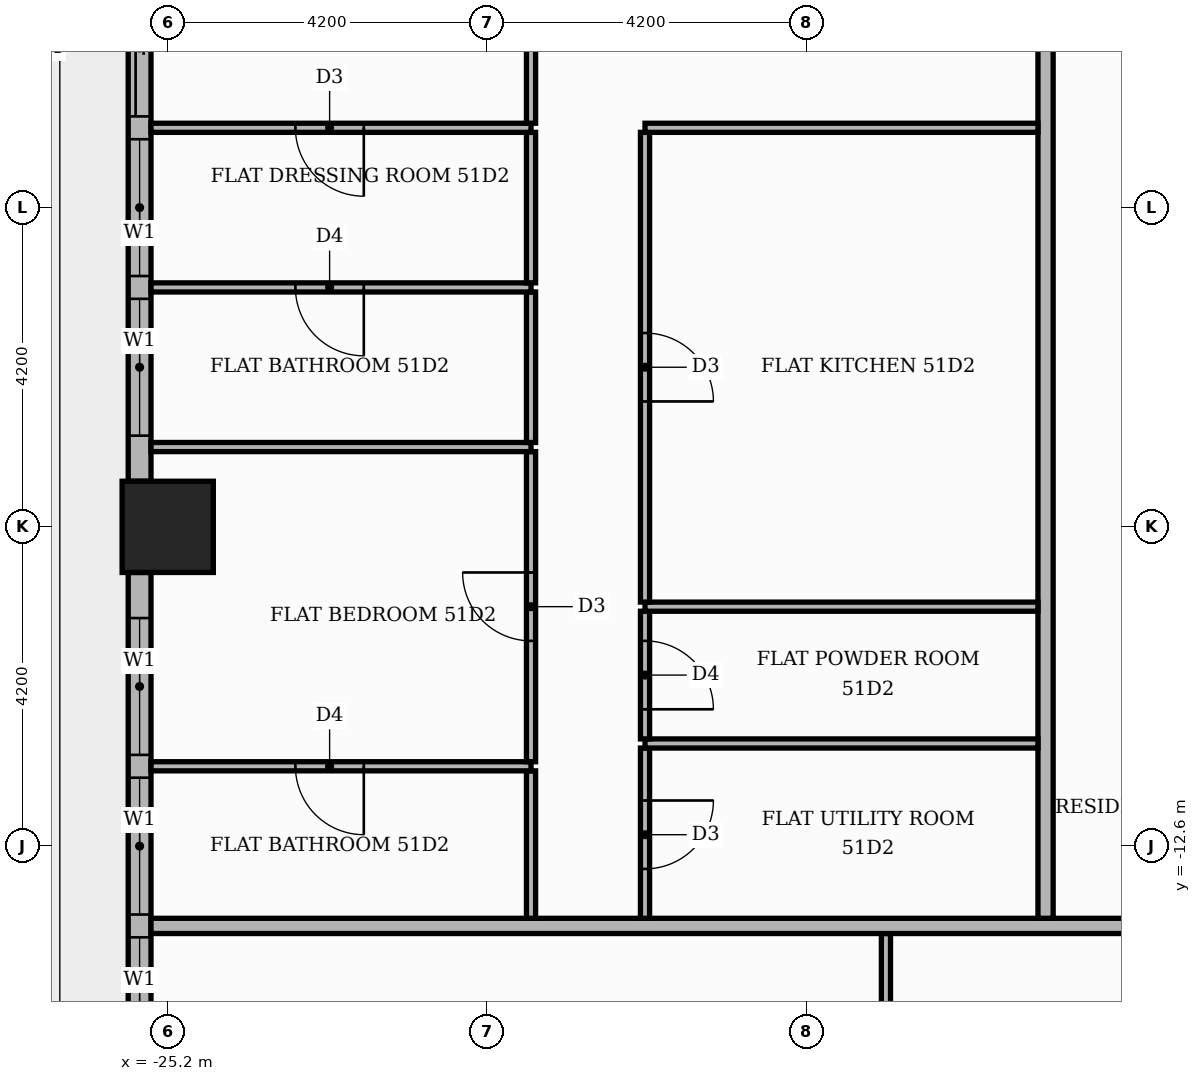
"""IFC4 building model, lengths in metres.
Left out: names, types, materials, properties, quantities, classifications, styles, units other than length and angle.
Written with IfcOpenShell. Run it as: python <this file> out.ifc"""

import sys

from ifc_helpers import new_model, si_unit, direction, frame, frame_2d, origin, origin_2d, place, context, subcontext, project, spatial, rectangle, extrude, element, fill, save


model = new_model("IFC4")
c1 = context("Model", 3, precision=1e-05, world=origin(), true_north=direction((0.0, 1.0)))
c2 = subcontext(c1, "Body", "Model", "MODEL_VIEW")
j1 = project(units=[si_unit("LENGTHUNIT", "METRE"), si_unit("PLANEANGLEUNIT", "RADIAN")], contexts=[c1])
p1 = place(None, origin())
s1 = spatial("IfcSite", under=j1, at=p1, CompositionType="ELEMENT")
p2 = place(p1, origin())
s2 = spatial("IfcBuilding", under=s1, at=p2, CompositionType="ELEMENT")
p3 = place(p2, frame((0.0, 0.0, 215.7)))
s3 = spatial("IfcBuildingStorey", under=s2, at=p3, CompositionType="ELEMENT", Elevation=215.7)
p4 = place(p3, frame((-25.2, -8.4, 0.0), z_axis=(0.0, 0.0, 1.0), x_axis=(1.0, 0.0, 0.0)))
e1 = element("IfcColumn", 1, at=p4, inside=s3, PredefinedType="COLUMN", context=c2, shape_type="SweptSolid", body=[
    extrude(rectangle(XDim=1.2, YDim=1.2, at=origin_2d()), origin(), (0.0, 0.0, 1.0), 3.9),
])
p5 = place(p3, frame((-25.57, -0.6, 0.0), z_axis=(0.0, 0.0, 1.0), x_axis=(0.0, -1.0, 0.0)))
e2 = element("IfcWall", 2, at=p5, inside=s3, PredefinedType="STANDARD", context=c2, shape_type="SweptSolid", body=[
    extrude(rectangle(XDim=7.2, YDim=0.3, at=frame_2d((3.6, 0.0))), origin(), (0.0, 0.0, 1.0), 3.48),
])
p6 = place(p5, frame((0.6, 0.0, 0.0)))
e3 = element("IfcOpeningElement", 3, at=p6, cuts=e2, PredefinedType="OPENING", context=c2, shape_type="SweptSolid", body=[
    extrude(rectangle(XDim=1.8, YDim=2.4, at=frame_2d((0.9, 1.2))), frame((0.0, 0.16, 0.0), z_axis=(0.0, -1.0, 0.0), x_axis=(1.0, 0.0, 0.0)), (0.0, 0.0, 1.0), 0.32),
])
p7 = place(p5, frame((2.7, 0.0, 0.9)))
e4 = element("IfcOpeningElement", 4, at=p7, cuts=e2, PredefinedType="OPENING", context=c2, shape_type="SweptSolid", body=[
    extrude(rectangle(XDim=1.8, YDim=2.1, at=frame_2d((0.9, 1.05))), frame((0.0, 0.16, 0.0), z_axis=(0.0, -1.0, 0.0), x_axis=(1.0, 0.0, 0.0)), (0.0, 0.0, 1.0), 0.32),
])
p8 = place(p5, frame((4.8, 0.0, 0.9)))
e5 = element("IfcOpeningElement", 5, at=p8, cuts=e2, PredefinedType="OPENING", context=c2, shape_type="SweptSolid", body=[
    extrude(rectangle(XDim=1.8, YDim=2.1, at=frame_2d((0.9, 1.05))), frame((0.0, 0.16, 0.0), z_axis=(0.0, -1.0, 0.0), x_axis=(1.0, 0.0, 0.0)), (0.0, 0.0, 1.0), 0.32),
])
p9 = place(p3, frame((-25.57, -9.0, 0.0), z_axis=(0.0, 0.0, 1.0), x_axis=(0.0, -1.0, 0.0)))
e6 = element("IfcWall", 6, at=p9, inside=s3, PredefinedType="STANDARD", context=c2, shape_type="SweptSolid", body=[
    extrude(rectangle(XDim=7.2, YDim=0.3, at=frame_2d((3.6, 0.0))), origin(), (0.0, 0.0, 1.0), 3.48),
])
p10 = place(p9, frame((0.6, 0.0, 0.9)))
e7 = element("IfcOpeningElement", 7, at=p10, cuts=e6, PredefinedType="OPENING", context=c2, shape_type="SweptSolid", body=[
    extrude(rectangle(XDim=1.8, YDim=2.1, at=frame_2d((0.9, 1.05))), frame((0.0, 0.16, 0.0), z_axis=(0.0, -1.0, 0.0), x_axis=(1.0, 0.0, 0.0)), (0.0, 0.0, 1.0), 0.32),
])
p11 = place(p9, frame((2.7, 0.0, 0.9)))
e8 = element("IfcOpeningElement", 8, at=p11, cuts=e6, PredefinedType="OPENING", context=c2, shape_type="SweptSolid", body=[
    extrude(rectangle(XDim=1.8, YDim=2.1, at=frame_2d((0.9, 1.05))), frame((0.0, 0.16, 0.0), z_axis=(0.0, -1.0, 0.0), x_axis=(1.0, 0.0, 0.0)), (0.0, 0.0, 1.0), 0.32),
])
p12 = place(p9, frame((4.8, 0.0, 0.9)))
e9 = element("IfcOpeningElement", 9, at=p12, cuts=e6, PredefinedType="OPENING", context=c2, shape_type="SweptSolid", body=[
    extrude(rectangle(XDim=1.8, YDim=2.1, at=frame_2d((0.9, 1.05))), frame((0.0, 0.16, 0.0), z_axis=(0.0, -1.0, 0.0), x_axis=(1.0, 0.0, 0.0)), (0.0, 0.0, 1.0), 0.32),
])
p13 = place(p3, frame((-15.75, -20.36, 0.0), z_axis=(0.0, 0.0, 1.0), x_axis=(0.0, 1.0, 0.0)))
e10 = element("IfcWall", 10, at=p13, inside=s3, PredefinedType="PARTITIONING", context=c2, shape_type="SweptSolid", body=[
    extrude(rectangle(XDim=6.61, YDim=0.12, at=frame_2d((3.305, 0.0))), origin(), (0.0, 0.0, 1.0), 3.48),
])
p14 = place(p13, frame((2.875, 0.0, 0.0)))
e11 = element("IfcOpeningElement", 11, at=p14, cuts=e10, PredefinedType="OPENING", context=c2, shape_type="SweptSolid", body=[
    extrude(rectangle(XDim=0.9, YDim=2.1, at=frame_2d((0.45, 1.05))), frame((0.0, 0.07, 0.0), z_axis=(0.0, -1.0, 0.0), x_axis=(1.0, 0.0, 0.0)), (0.0, 0.0, 1.0), 0.14),
])
p15 = place(p3, frame((-25.42, -13.65, 0.0), z_axis=(0.0, 0.0, 1.0), x_axis=(1.0, 0.0, 0.0)))
e12 = element("IfcWall", 12, at=p15, inside=s3, PredefinedType="PARTITIONING", context=c2, shape_type="SweptSolid", body=[
    extrude(rectangle(XDim=39.07, YDim=0.2, at=frame_2d((19.535, 0.0))), origin(), (0.0, 0.0, 1.0), 3.48),
])
p16 = place(p15, frame((13.32, 0.0, 0.0)))
e13 = element("IfcOpeningElement", 13, at=p16, cuts=e12, PredefinedType="OPENING", context=c2, shape_type="SweptSolid", body=[
    extrude(rectangle(XDim=1.1, YDim=2.4, at=frame_2d((0.55, 1.2))), frame((0.0, 0.11, 0.0), z_axis=(0.0, -1.0, 0.0), x_axis=(1.0, 0.0, 0.0)), (0.0, 0.0, 1.0), 0.22),
])
p17 = place(p3, frame((-20.42, -13.55, 0.0), z_axis=(0.0, 0.0, 1.0), x_axis=(0.0, 1.0, 0.0)))
e14 = element("IfcWall", 14, at=p17, inside=s3, PredefinedType="PARTITIONING", context=c2, shape_type="SweptSolid", body=[
    extrude(rectangle(XDim=1.94, YDim=0.12, at=frame_2d((0.97, 0.0))), origin(), (0.0, 0.0, 1.0), 3.48),
])
p18 = place(p3, frame((-18.92, -13.55, 0.0), z_axis=(0.0, 0.0, 1.0), x_axis=(0.0, 1.0, 0.0)))
e15 = element("IfcWall", 15, at=p18, inside=s3, PredefinedType="PARTITIONING", context=c2, shape_type="SweptSolid", body=[
    extrude(rectangle(XDim=2.24, YDim=0.12, at=frame_2d((1.12, 0.0))), origin(), (0.0, 0.0, 1.0), 3.48),
])
p19 = place(p18, frame((0.65, 0.0, 0.0)))
e16 = element("IfcOpeningElement", 16, at=p19, cuts=e15, PredefinedType="OPENING", context=c2, shape_type="SweptSolid", body=[
    extrude(rectangle(XDim=0.9, YDim=2.1, at=frame_2d((0.45, 1.05))), frame((0.0, 0.07, 0.0), z_axis=(0.0, -1.0, 0.0), x_axis=(1.0, 0.0, 0.0)), (0.0, 0.0, 1.0), 0.14),
])
p20 = place(p3, frame((-13.65, -13.55, 0.0), z_axis=(0.0, 0.0, 1.0), x_axis=(0.0, 1.0, 0.0)))
e17 = element("IfcWall", 17, at=p20, inside=s3, PredefinedType="PARTITIONING", context=c2, shape_type="SweptSolid", body=[
    extrude(rectangle(XDim=18.7, YDim=0.2, at=frame_2d((9.35, 0.0))), origin(), (0.0, 0.0, 1.0), 3.48),
])
p21 = place(p20, frame((11.95, 0.0, 0.0)))
e18 = element("IfcOpeningElement", 18, at=p21, cuts=e17, PredefinedType="OPENING", context=c2, shape_type="SweptSolid", body=[
    extrude(rectangle(XDim=1.1, YDim=2.4, at=frame_2d((0.55, 1.2))), frame((0.0, 0.11, 0.0), z_axis=(0.0, -1.0, 0.0), x_axis=(1.0, 0.0, 0.0)), (0.0, 0.0, 1.0), 0.22),
])
p22 = place(p3, frame((-25.42, -11.55, 0.0), z_axis=(0.0, 0.0, 1.0), x_axis=(1.0, 0.0, 0.0)))
e19 = element("IfcWall", 19, at=p22, inside=s3, PredefinedType="PARTITIONING", context=c2, shape_type="SweptSolid", body=[
    extrude(rectangle(XDim=5.0, YDim=0.12, at=frame_2d((2.5, 0.0))), origin(), (0.0, 0.0, 1.0), 3.48),
])
p23 = place(p22, frame((1.9, 0.0, 0.0)))
e20 = element("IfcOpeningElement", 20, at=p23, cuts=e19, PredefinedType="OPENING", context=c2, shape_type="SweptSolid", body=[
    extrude(rectangle(XDim=0.9, YDim=2.1, at=frame_2d((0.45, 1.05))), frame((0.0, 0.07, 0.0), z_axis=(0.0, -1.0, 0.0), x_axis=(1.0, 0.0, 0.0)), (0.0, 0.0, 1.0), 0.14),
])
p24 = place(p3, frame((-20.42, -11.49, 0.0), z_axis=(0.0, 0.0, 1.0), x_axis=(0.0, 1.0, 0.0)))
e21 = element("IfcWall", 21, at=p24, inside=s3, PredefinedType="PARTITIONING", context=c2, shape_type="SweptSolid", body=[
    extrude(rectangle(XDim=4.08, YDim=0.12, at=frame_2d((2.04, 0.0))), origin(), (0.0, 0.0, 1.0), 3.48),
])
p25 = place(p24, frame((1.59, 0.0, 0.0)))
e22 = element("IfcOpeningElement", 22, at=p25, cuts=e21, PredefinedType="OPENING", context=c2, shape_type="SweptSolid", body=[
    extrude(rectangle(XDim=0.9, YDim=2.1, at=frame_2d((0.45, 1.05))), frame((0.0, 0.07, 0.0), z_axis=(0.0, -1.0, 0.0), x_axis=(1.0, 0.0, 0.0)), (0.0, 0.0, 1.0), 0.14),
])
p26 = place(p3, frame((-18.92, -11.25, 0.0), z_axis=(0.0, 0.0, 1.0), x_axis=(1.0, 0.0, 0.0)))
e23 = element("IfcWall", 23, at=p26, inside=s3, PredefinedType="PARTITIONING", context=c2, shape_type="SweptSolid", body=[
    extrude(rectangle(XDim=5.17, YDim=0.12, at=frame_2d((2.585, 0.0))), origin(), (0.0, 0.0, 1.0), 3.48),
])
p27 = place(p3, frame((-18.92, -11.19, 0.0), z_axis=(0.0, 0.0, 1.0), x_axis=(0.0, 1.0, 0.0)))
e24 = element("IfcWall", 24, at=p27, inside=s3, PredefinedType="PARTITIONING", context=c2, shape_type="SweptSolid", body=[
    extrude(rectangle(XDim=1.68, YDim=0.12, at=frame_2d((0.84, 0.0))), origin(), (0.0, 0.0, 1.0), 3.48),
])
p28 = place(p27, frame((0.39, 0.0, 0.0)))
e25 = element("IfcOpeningElement", 25, at=p28, cuts=e24, PredefinedType="OPENING", context=c2, shape_type="SweptSolid", body=[
    extrude(rectangle(XDim=0.9, YDim=2.1, at=frame_2d((0.45, 1.05))), frame((0.0, 0.07, 0.0), z_axis=(0.0, -1.0, 0.0), x_axis=(1.0, 0.0, 0.0)), (0.0, 0.0, 1.0), 0.14),
])
p29 = place(p3, frame((-18.92, -9.45, 0.0), z_axis=(0.0, 0.0, 1.0), x_axis=(1.0, 0.0, 0.0)))
e26 = element("IfcWall", 26, at=p29, inside=s3, PredefinedType="PARTITIONING", context=c2, shape_type="SweptSolid", body=[
    extrude(rectangle(XDim=5.17, YDim=0.12, at=frame_2d((2.585, 0.0))), origin(), (0.0, 0.0, 1.0), 3.48),
])
p30 = place(p3, frame((-18.92, -9.39, 0.0), z_axis=(0.0, 0.0, 1.0), x_axis=(0.0, 1.0, 0.0)))
e27 = element("IfcWall", 27, at=p30, inside=s3, PredefinedType="PARTITIONING", context=c2, shape_type="SweptSolid", body=[
    extrude(rectangle(XDim=6.18, YDim=0.12, at=frame_2d((3.09, 0.0))), origin(), (0.0, 0.0, 1.0), 3.48),
])
p31 = place(p30, frame((2.64, 0.0, 0.0)))
e28 = element("IfcOpeningElement", 28, at=p31, cuts=e27, PredefinedType="OPENING", context=c2, shape_type="SweptSolid", body=[
    extrude(rectangle(XDim=0.9, YDim=2.1, at=frame_2d((0.45, 1.05))), frame((0.0, 0.07, 0.0), z_axis=(0.0, -1.0, 0.0), x_axis=(1.0, 0.0, 0.0)), (0.0, 0.0, 1.0), 0.14),
])
p32 = place(p3, frame((-25.42, -7.35, 0.0), z_axis=(0.0, 0.0, 1.0), x_axis=(1.0, 0.0, 0.0)))
e29 = element("IfcWall", 29, at=p32, inside=s3, PredefinedType="PARTITIONING", context=c2, shape_type="SweptSolid", body=[
    extrude(rectangle(XDim=5.0, YDim=0.12, at=frame_2d((2.5, 0.0))), origin(), (0.0, 0.0, 1.0), 3.48),
])
p33 = place(p3, frame((-20.42, -7.29, 0.0), z_axis=(0.0, 0.0, 1.0), x_axis=(0.0, 1.0, 0.0)))
e30 = element("IfcWall", 30, at=p33, inside=s3, PredefinedType="PARTITIONING", context=c2, shape_type="SweptSolid", body=[
    extrude(rectangle(XDim=1.98, YDim=0.12, at=frame_2d((0.99, 0.0))), origin(), (0.0, 0.0, 1.0), 3.48),
])
p34 = place(p3, frame((-25.42, -5.25, 0.0), z_axis=(0.0, 0.0, 1.0), x_axis=(1.0, 0.0, 0.0)))
e31 = element("IfcWall", 31, at=p34, inside=s3, PredefinedType="PARTITIONING", context=c2, shape_type="SweptSolid", body=[
    extrude(rectangle(XDim=5.0, YDim=0.12, at=frame_2d((2.5, 0.0))), origin(), (0.0, 0.0, 1.0), 3.48),
])
p35 = place(p34, frame((1.9, 0.0, 0.0)))
e32 = element("IfcOpeningElement", 32, at=p35, cuts=e31, PredefinedType="OPENING", context=c2, shape_type="SweptSolid", body=[
    extrude(rectangle(XDim=0.9, YDim=2.1, at=frame_2d((0.45, 1.05))), frame((0.0, 0.07, 0.0), z_axis=(0.0, -1.0, 0.0), x_axis=(1.0, 0.0, 0.0)), (0.0, 0.0, 1.0), 0.14),
])
p36 = place(p3, frame((-20.42, -5.19, 0.0), z_axis=(0.0, 0.0, 1.0), x_axis=(0.0, 1.0, 0.0)))
e33 = element("IfcWall", 33, at=p36, inside=s3, PredefinedType="PARTITIONING", context=c2, shape_type="SweptSolid", body=[
    extrude(rectangle(XDim=1.98, YDim=0.12, at=frame_2d((0.99, 0.0))), origin(), (0.0, 0.0, 1.0), 3.48),
])
p37 = place(p3, frame((-25.42, -3.15, 0.0), z_axis=(0.0, 0.0, 1.0), x_axis=(1.0, 0.0, 0.0)))
e34 = element("IfcWall", 34, at=p37, inside=s3, PredefinedType="PARTITIONING", context=c2, shape_type="SweptSolid", body=[
    extrude(rectangle(XDim=5.0, YDim=0.12, at=frame_2d((2.5, 0.0))), origin(), (0.0, 0.0, 1.0), 3.48),
])
p38 = place(p37, frame((1.9, 0.0, 0.0)))
e35 = element("IfcOpeningElement", 35, at=p38, cuts=e34, PredefinedType="OPENING", context=c2, shape_type="SweptSolid", body=[
    extrude(rectangle(XDim=0.9, YDim=2.1, at=frame_2d((0.45, 1.05))), frame((0.0, 0.07, 0.0), z_axis=(0.0, -1.0, 0.0), x_axis=(1.0, 0.0, 0.0)), (0.0, 0.0, 1.0), 0.14),
])
p39 = place(p3, frame((-18.92, -3.15, 0.0), z_axis=(0.0, 0.0, 1.0), x_axis=(1.0, 0.0, 0.0)))
e36 = element("IfcWall", 36, at=p39, inside=s3, PredefinedType="PARTITIONING", context=c2, shape_type="SweptSolid", body=[
    extrude(rectangle(XDim=5.17, YDim=0.12, at=frame_2d((2.585, 0.0))), origin(), (0.0, 0.0, 1.0), 3.48),
])
p40 = place(p3, frame((-20.42, -3.09, 0.0), z_axis=(0.0, 0.0, 1.0), x_axis=(0.0, 1.0, 0.0)))
e37 = element("IfcWall", 37, at=p40, inside=s3, PredefinedType="PARTITIONING", context=c2, shape_type="SweptSolid", body=[
    extrude(rectangle(XDim=4.08, YDim=0.12, at=frame_2d((2.04, 0.0))), origin(), (0.0, 0.0, 1.0), 3.48),
])
p41 = place(p40, frame((1.59, 0.0, 0.0)))
e38 = element("IfcOpeningElement", 38, at=p41, cuts=e37, PredefinedType="OPENING", context=c2, shape_type="SweptSolid", body=[
    extrude(rectangle(XDim=0.9, YDim=2.1, at=frame_2d((0.45, 1.05))), frame((0.0, 0.07, 0.0), z_axis=(0.0, -1.0, 0.0), x_axis=(1.0, 0.0, 0.0)), (0.0, 0.0, 1.0), 0.14),
])
p42 = place(p6, origin())
e39 = element("IfcDoor", 39, at=p42, inside=s3, OperationType="SLIDING_TO_LEFT", PredefinedType="DOOR", context=c2, shape_type="SweptSolid", body=[
    extrude(rectangle(XDim=1.8, YDim=2.4, at=frame_2d((0.9, 1.2))), frame((0.0, 0.025, 0.0), z_axis=(0.0, -1.0, 0.0), x_axis=(1.0, 0.0, 0.0)), (0.0, 0.0, 1.0), 0.05),
])
fill(e3, e39)
p43 = place(p7, origin())
e40 = element("IfcWindow", 40, at=p43, inside=s3, PartitioningType="SINGLE_PANEL", PredefinedType="WINDOW", context=c2, shape_type="SweptSolid", body=[
    extrude(rectangle(XDim=1.8, YDim=2.1, at=frame_2d((0.9, 1.05))), frame((0.0, 0.03, 0.0), z_axis=(0.0, -1.0, 0.0), x_axis=(1.0, 0.0, 0.0)), (0.0, 0.0, 1.0), 0.06),
])
fill(e4, e40)
p44 = place(p8, origin())
e41 = element("IfcWindow", 41, at=p44, inside=s3, PartitioningType="SINGLE_PANEL", PredefinedType="WINDOW", context=c2, shape_type="SweptSolid", body=[
    extrude(rectangle(XDim=1.8, YDim=2.1, at=frame_2d((0.9, 1.05))), frame((0.0, 0.03, 0.0), z_axis=(0.0, -1.0, 0.0), x_axis=(1.0, 0.0, 0.0)), (0.0, 0.0, 1.0), 0.06),
])
fill(e5, e41)
p45 = place(p10, origin())
e42 = element("IfcWindow", 42, at=p45, inside=s3, PartitioningType="SINGLE_PANEL", PredefinedType="WINDOW", context=c2, shape_type="SweptSolid", body=[
    extrude(rectangle(XDim=1.8, YDim=2.1, at=frame_2d((0.9, 1.05))), frame((0.0, 0.03, 0.0), z_axis=(0.0, -1.0, 0.0), x_axis=(1.0, 0.0, 0.0)), (0.0, 0.0, 1.0), 0.06),
])
fill(e7, e42)
p46 = place(p11, origin())
e43 = element("IfcWindow", 43, at=p46, inside=s3, PartitioningType="SINGLE_PANEL", PredefinedType="WINDOW", context=c2, shape_type="SweptSolid", body=[
    extrude(rectangle(XDim=1.8, YDim=2.1, at=frame_2d((0.9, 1.05))), frame((0.0, 0.03, 0.0), z_axis=(0.0, -1.0, 0.0), x_axis=(1.0, 0.0, 0.0)), (0.0, 0.0, 1.0), 0.06),
])
fill(e8, e43)
p47 = place(p12, origin())
e44 = element("IfcWindow", 44, at=p47, inside=s3, PartitioningType="SINGLE_PANEL", PredefinedType="WINDOW", context=c2, shape_type="SweptSolid", body=[
    extrude(rectangle(XDim=1.8, YDim=2.1, at=frame_2d((0.9, 1.05))), frame((0.0, 0.03, 0.0), z_axis=(0.0, -1.0, 0.0), x_axis=(1.0, 0.0, 0.0)), (0.0, 0.0, 1.0), 0.06),
])
fill(e9, e44)
p48 = place(p31, frame((0.9, 0.0, 0.0), z_axis=(0.0, 0.0, 1.0), x_axis=(-1.0, 0.0, 0.0)))
e45 = element("IfcDoor", 45, at=p48, inside=s3, OperationType="SINGLE_SWING_LEFT", PredefinedType="DOOR", context=c2, shape_type="SweptSolid", body=[
    extrude(rectangle(XDim=0.9, YDim=2.1, at=frame_2d((0.45, 1.05))), frame((0.0, 0.025, 0.0), z_axis=(0.0, -1.0, 0.0), x_axis=(1.0, 0.0, 0.0)), (0.0, 0.0, 1.0), 0.05),
])
fill(e28, e45)
p49 = place(p28, frame((0.9, 0.0, 0.0), z_axis=(0.0, 0.0, 1.0), x_axis=(-1.0, 0.0, 0.0)))
e46 = element("IfcDoor", 46, at=p49, inside=s3, OperationType="SINGLE_SWING_LEFT", PredefinedType="DOOR", context=c2, shape_type="SweptSolid", body=[
    extrude(rectangle(XDim=0.9, YDim=2.1, at=frame_2d((0.45, 1.05))), frame((0.0, 0.025, 0.0), z_axis=(0.0, -1.0, 0.0), x_axis=(1.0, 0.0, 0.0)), (0.0, 0.0, 1.0), 0.05),
])
fill(e25, e46)
p50 = place(p19, frame((0.9, 0.0, 0.0), z_axis=(0.0, 0.0, 1.0), x_axis=(-1.0, 0.0, 0.0)))
e47 = element("IfcDoor", 47, at=p50, inside=s3, OperationType="SINGLE_SWING_RIGHT", PredefinedType="DOOR", context=c2, shape_type="SweptSolid", body=[
    extrude(rectangle(XDim=0.9, YDim=2.1, at=frame_2d((0.45, 1.05))), frame((0.0, 0.025, 0.0), z_axis=(0.0, -1.0, 0.0), x_axis=(1.0, 0.0, 0.0)), (0.0, 0.0, 1.0), 0.05),
])
fill(e16, e47)
p51 = place(p38, frame((0.9, 0.0, 0.0), z_axis=(0.0, 0.0, 1.0), x_axis=(-1.0, 0.0, 0.0)))
e48 = element("IfcDoor", 48, at=p51, inside=s3, OperationType="SINGLE_SWING_RIGHT", PredefinedType="DOOR", context=c2, shape_type="SweptSolid", body=[
    extrude(rectangle(XDim=0.9, YDim=2.1, at=frame_2d((0.45, 1.05))), frame((0.0, 0.025, 0.0), z_axis=(0.0, -1.0, 0.0), x_axis=(1.0, 0.0, 0.0)), (0.0, 0.0, 1.0), 0.05),
])
fill(e35, e48)
p52 = place(p35, frame((0.9, 0.0, 0.0), z_axis=(0.0, 0.0, 1.0), x_axis=(-1.0, 0.0, 0.0)))
e49 = element("IfcDoor", 49, at=p52, inside=s3, OperationType="SINGLE_SWING_RIGHT", PredefinedType="DOOR", context=c2, shape_type="SweptSolid", body=[
    extrude(rectangle(XDim=0.9, YDim=2.1, at=frame_2d((0.45, 1.05))), frame((0.0, 0.025, 0.0), z_axis=(0.0, -1.0, 0.0), x_axis=(1.0, 0.0, 0.0)), (0.0, 0.0, 1.0), 0.05),
])
fill(e32, e49)
p53 = place(p25, origin())
e50 = element("IfcDoor", 50, at=p53, inside=s3, OperationType="SINGLE_SWING_RIGHT", PredefinedType="DOOR", context=c2, shape_type="SweptSolid", body=[
    extrude(rectangle(XDim=0.9, YDim=2.1, at=frame_2d((0.45, 1.05))), frame((0.0, 0.025, 0.0), z_axis=(0.0, -1.0, 0.0), x_axis=(1.0, 0.0, 0.0)), (0.0, 0.0, 1.0), 0.05),
])
fill(e22, e50)
p54 = place(p23, frame((0.9, 0.0, 0.0), z_axis=(0.0, 0.0, 1.0), x_axis=(-1.0, 0.0, 0.0)))
e51 = element("IfcDoor", 51, at=p54, inside=s3, OperationType="SINGLE_SWING_RIGHT", PredefinedType="DOOR", context=c2, shape_type="SweptSolid", body=[
    extrude(rectangle(XDim=0.9, YDim=2.1, at=frame_2d((0.45, 1.05))), frame((0.0, 0.025, 0.0), z_axis=(0.0, -1.0, 0.0), x_axis=(1.0, 0.0, 0.0)), (0.0, 0.0, 1.0), 0.05),
])
fill(e20, e51)
save(model, sys.argv[1])
